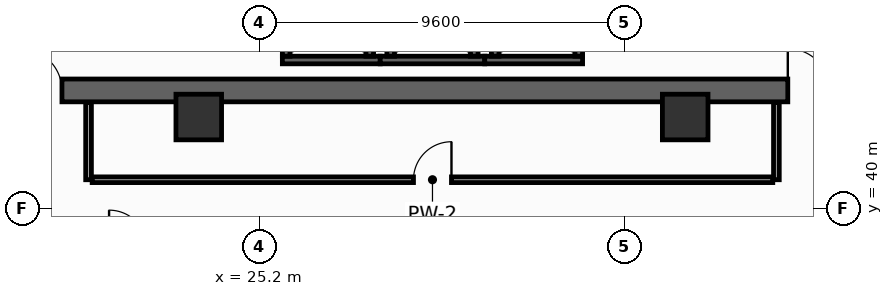
"""IFC4 building model, lengths in metres.
Left out: names, types, materials, properties, quantities, classifications, styles, units other than length and angle.
Written with IfcOpenShell. Run it as: python <this file> out.ifc"""

import sys

from ifc_helpers import new_model, si_unit, direction, frame, frame_2d, origin, origin_2d, place, context, subcontext, project, spatial, rectangle, hollow_rectangle, extrude, element, fill, save


model = new_model("IFC4")
c1 = context("Model", 3, precision=1e-05, world=origin(), true_north=direction((0.0, 1.0)))
c2 = subcontext(c1, "Body", "Model", "MODEL_VIEW")
j1 = project(units=[si_unit("LENGTHUNIT", "METRE"), si_unit("PLANEANGLEUNIT", "RADIAN")], contexts=[c1])
p1 = place(None, origin())
s1 = spatial("IfcSite", under=j1, at=p1, CompositionType="ELEMENT")
p2 = place(p1, origin())
s2 = spatial("IfcBuilding", under=s1, at=p2, CompositionType="ELEMENT")
p3 = place(p2, frame((0.0, 0.0, 78.0)))
s3 = spatial("IfcBuildingStorey", under=s2, at=p3, CompositionType="ELEMENT", Elevation=78.0)
p4 = place(p3, frame((13.5, 43.1, 0.0), z_axis=(0.0, 0.0, 1.0), x_axis=(1.0, 0.0, 0.0)))
e1 = element("IfcWall", 1, at=p4, inside=s3, PredefinedType="SHEAR", context=c2, shape_type="SweptSolid", body=[
    extrude(rectangle(XDim=32.9, YDim=0.6, at=frame_2d((16.45, 0.0))), origin(), (0.0, 0.0, 1.0), 4.15),
])
p5 = place(p4, frame((5.4, 0.0, 0.0)))
e2 = element("IfcOpeningElement", 2, at=p5, cuts=e1, PredefinedType="OPENING", context=c2, shape_type="SweptSolid", body=[
    extrude(rectangle(XDim=1.1, YDim=2.15, at=frame_2d((0.55, 1.075))), frame((0.0, 0.31, 0.0), z_axis=(0.0, -1.0, 0.0), x_axis=(1.0, 0.0, 0.0)), (0.0, 0.0, 1.0), 0.62),
])
p6 = place(p4, frame((25.6, 0.0, 0.0)))
e3 = element("IfcOpeningElement", 3, at=p6, cuts=e1, PredefinedType="OPENING", context=c2, shape_type="SweptSolid", body=[
    extrude(rectangle(XDim=1.1, YDim=2.15, at=frame_2d((0.55, 1.075))), frame((0.0, 0.31, 0.0), z_axis=(0.0, -1.0, 0.0), x_axis=(1.0, 0.0, 0.0)), (0.0, 0.0, 1.0), 0.62),
])
for number, where, z_axis, x_axis in (
    (4, (23.6, 42.4, 0.0), (0.0, 0.0, 1.0), (1.0, 0.0, 0.0)),
    (5, (36.4, 42.4, 0.0), (0.0, 0.0, 1.0), (1.0, 0.0, 0.0)),
):
    element("IfcColumn", number, at=place(p3, frame(where, z_axis=z_axis, x_axis=x_axis)), inside=s3, PredefinedType="COLUMN", context=c2, shape_type="SweptSolid", body=[
        extrude(hollow_rectangle(XDim=1.2, YDim=1.2, WallThickness=0.055, at=origin_2d()), origin(), (0.0, 0.0, 1.0), 4.4),
    ])
p7 = place(p3, frame((25.8, 43.9, 0.0), z_axis=(0.0, 0.0, 1.0), x_axis=(1.0, 0.0, 0.0)))
e6 = element("IfcWall", 6, at=p7, inside=s3, PredefinedType="SHEAR", context=c2, shape_type="SweptSolid", body=[
    extrude(rectangle(XDim=2.575, YDim=0.2, at=frame_2d((1.288, 0.0))), origin(), (0.0, 0.0, 1.0), 4.15),
])
for number, where, z_axis, x_axis in (
    (7, (25.9, 44.0, 0.0), (0.0, 0.0, 1.0), (0.0, 1.0, 0.0)),
    (8, (28.1, 44.0, 0.0), (0.0, 0.0, 1.0), (0.0, 1.0, 0.0)),
):
    element("IfcWall", number, at=place(p3, frame(where, z_axis=z_axis, x_axis=x_axis)), inside=s3, PredefinedType="SHEAR", context=c2, shape_type="SweptSolid", body=[
        extrude(rectangle(XDim=2.3, YDim=0.2, at=frame_2d((1.15, 0.0))), origin(), (0.0, 0.0, 1.0), 4.15),
    ])
p8 = place(p3, frame((28.375, 43.9, 0.0), z_axis=(0.0, 0.0, 1.0), x_axis=(1.0, 0.0, 0.0)))
e9 = element("IfcWall", 9, at=p8, inside=s3, PredefinedType="SHEAR", context=c2, shape_type="SweptSolid", body=[
    extrude(rectangle(XDim=2.75, YDim=0.2, at=frame_2d((1.375, 0.0))), origin(), (0.0, 0.0, 1.0), 4.15),
])
for number, where, z_axis, x_axis in (
    (10, (28.65, 44.0, 0.0), (0.0, 0.0, 1.0), (0.0, 1.0, 0.0)),
    (11, (30.85, 44.0, 0.0), (0.0, 0.0, 1.0), (0.0, 1.0, 0.0)),
):
    element("IfcWall", number, at=place(p3, frame(where, z_axis=z_axis, x_axis=x_axis)), inside=s3, PredefinedType="SHEAR", context=c2, shape_type="SweptSolid", body=[
        extrude(rectangle(XDim=2.3, YDim=0.2, at=frame_2d((1.15, 0.0))), origin(), (0.0, 0.0, 1.0), 4.15),
    ])
p9 = place(p3, frame((31.125, 43.9, 0.0), z_axis=(0.0, 0.0, 1.0), x_axis=(1.0, 0.0, 0.0)))
e12 = element("IfcWall", 12, at=p9, inside=s3, PredefinedType="SHEAR", context=c2, shape_type="SweptSolid", body=[
    extrude(rectangle(XDim=2.575, YDim=0.2, at=frame_2d((1.288, 0.0))), origin(), (0.0, 0.0, 1.0), 4.15),
])
for number, where, z_axis, x_axis in (
    (13, (31.4, 44.0, 0.0), (0.0, 0.0, 1.0), (0.0, 1.0, 0.0)),
    (14, (33.6, 44.0, 0.0), (0.0, 0.0, 1.0), (0.0, 1.0, 0.0)),
):
    element("IfcWall", number, at=place(p3, frame(where, z_axis=z_axis, x_axis=x_axis)), inside=s3, PredefinedType="SHEAR", context=c2, shape_type="SweptSolid", body=[
        extrude(rectangle(XDim=2.3, YDim=0.2, at=frame_2d((1.15, 0.0))), origin(), (0.0, 0.0, 1.0), 4.15),
    ])
for number, where, z_axis, x_axis in (
    (15, (20.7, 40.75, 0.0), (0.0, 0.0, 1.0), (0.0, 1.0, 0.0)),
    (16, (38.8, 40.75, 0.0), (0.0, 0.0, 1.0), (0.0, 1.0, 0.0)),
):
    element("IfcWall", number, at=place(p3, frame(where, z_axis=z_axis, x_axis=x_axis)), inside=s3, PredefinedType="PARTITIONING", context=c2, shape_type="SweptSolid", body=[
        extrude(rectangle(XDim=2.03, YDim=0.15, at=frame_2d((1.015, 0.0))), origin(), (0.0, 0.0, 1.0), 4.15),
    ])
p10 = place(p3, frame((20.795, 40.75, 0.0), z_axis=(0.0, 0.0, 1.0), x_axis=(1.0, 0.0, 0.0)))
e17 = element("IfcWall", 17, at=p10, inside=s3, PredefinedType="PARTITIONING", context=c2, shape_type="SweptSolid", body=[
    extrude(rectangle(XDim=17.91, YDim=0.15, at=frame_2d((8.955, 0.0))), origin(), (0.0, 0.0, 1.0), 3.335),
])
p11 = place(p10, frame((8.455, 0.0, 0.0)))
e18 = element("IfcOpeningElement", 18, at=p11, cuts=e17, PredefinedType="OPENING", context=c2, shape_type="SweptSolid", body=[
    extrude(rectangle(XDim=1.0, YDim=2.15, at=frame_2d((0.5, 1.075))), frame((0.0, 0.085, 0.0), z_axis=(0.0, -1.0, 0.0), x_axis=(1.0, 0.0, 0.0)), (0.0, 0.0, 1.0), 0.17),
])
p12 = place(p5, origin())
e19 = element("IfcDoor", 19, at=p12, inside=s3, OperationType="SINGLE_SWING_LEFT", PredefinedType="DOOR", context=c2, shape_type="SweptSolid", body=[
    extrude(rectangle(XDim=1.1, YDim=2.15, at=frame_2d((0.55, 1.075))), frame((0.0, 0.025, 0.0), z_axis=(0.0, -1.0, 0.0), x_axis=(1.0, 0.0, 0.0)), (0.0, 0.0, 1.0), 0.05),
])
fill(e2, e19)
p13 = place(p6, origin())
e20 = element("IfcDoor", 20, at=p13, inside=s3, OperationType="SINGLE_SWING_LEFT", PredefinedType="DOOR", context=c2, shape_type="SweptSolid", body=[
    extrude(rectangle(XDim=1.1, YDim=2.15, at=frame_2d((0.55, 1.075))), frame((0.0, 0.025, 0.0), z_axis=(0.0, -1.0, 0.0), x_axis=(1.0, 0.0, 0.0)), (0.0, 0.0, 1.0), 0.05),
])
fill(e3, e20)
p14 = place(p11, origin())
e21 = element("IfcDoor", 21, at=p14, inside=s3, OperationType="SINGLE_SWING_RIGHT", PredefinedType="DOOR", context=c2, shape_type="SweptSolid", body=[
    extrude(rectangle(XDim=1.0, YDim=2.15, at=frame_2d((0.5, 1.075))), frame((0.0, 0.025, 0.0), z_axis=(0.0, -1.0, 0.0), x_axis=(1.0, 0.0, 0.0)), (0.0, 0.0, 1.0), 0.05),
])
fill(e18, e21)
save(model, sys.argv[1])
